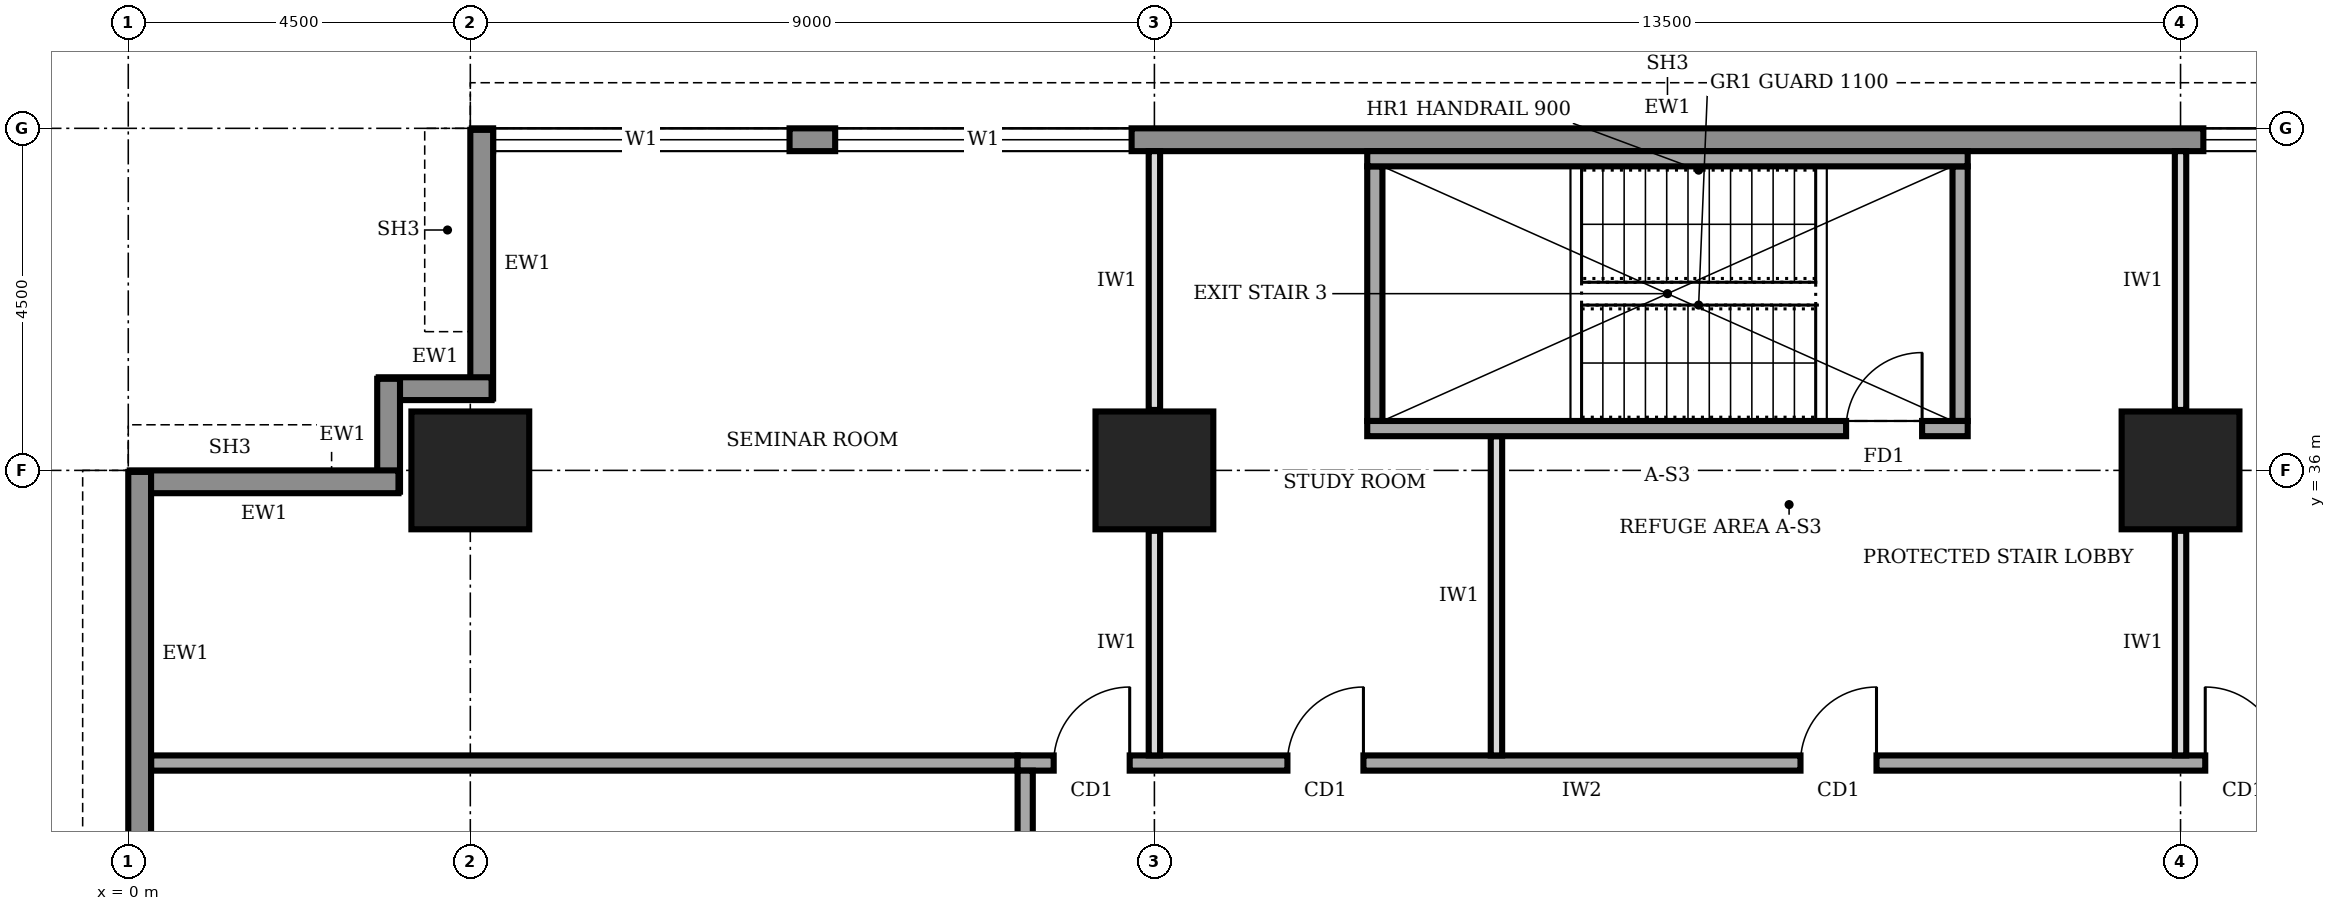
"""IFC4 building model, lengths in metres.
Left out: names, types, materials, properties, quantities, classifications, styles, units other than length and angle.
Written with IfcOpenShell. Run it as: python <this file> out.ifc"""

import sys

from ifc_helpers import new_model, si_unit, direction, frame, frame_2d, origin, origin_2d, place, context, subcontext, project, spatial, rectangle, extrude, element, fill, save


model = new_model("IFC4")
c1 = context("Model", 3, precision=1e-05, world=origin(), true_north=direction((0.0, 1.0)))
c2 = subcontext(c1, "Body", "Model", "MODEL_VIEW")
j1 = project(units=[si_unit("LENGTHUNIT", "METRE"), si_unit("PLANEANGLEUNIT", "RADIAN")], contexts=[c1])
p1 = place(None, origin())
s1 = spatial("IfcSite", under=j1, at=p1, CompositionType="ELEMENT")
p2 = place(p1, origin())
s2 = spatial("IfcBuilding", under=s1, at=p2, CompositionType="ELEMENT")
p3 = place(p2, frame((0.0, 0.0, 225.0)))
s3 = spatial("IfcBuildingStorey", under=s2, at=p3, CompositionType="ELEMENT", Elevation=225.0)
for number, where, z_axis, x_axis in (
    (1, (4.5, 36.0, 0.0), (0.0, 0.0, 1.0), (1.0, 0.0, 0.0)),
    (2, (13.5, 36.0, 0.0), (0.0, 0.0, 1.0), (1.0, 0.0, 0.0)),
    (3, (27.0, 36.0, 0.0), (0.0, 0.0, 1.0), (1.0, 0.0, 0.0)),
):
    element("IfcColumn", number, at=place(p3, frame(where, z_axis=z_axis, x_axis=x_axis)), inside=s3, PredefinedType="COLUMN", context=c2, shape_type="SweptSolid", body=[
        extrude(rectangle(XDim=1.55, YDim=1.55, at=origin_2d()), origin(), (0.0, 0.0, 1.0), 4.0),
    ])
p4 = place(p3, frame((35.98, 40.35, 0.0), z_axis=(0.0, 0.0, 1.0), x_axis=(-1.0, 0.0, 0.0)))
e4 = element("IfcWall", 4, at=p4, inside=s3, PredefinedType="STANDARD", context=c2, shape_type="SweptSolid", body=[
    extrude(rectangle(XDim=31.46, YDim=0.3, at=frame_2d((15.73, 0.0))), origin(), (0.0, 0.0, 1.0), 3.75),
])
p5 = place(p4, frame((27.28, 0.0, 0.9)))
e5 = element("IfcOpeningElement", 5, at=p5, cuts=e4, PredefinedType="OPENING", context=c2, shape_type="SweptSolid", body=[
    extrude(rectangle(XDim=3.9, YDim=2.2, at=frame_2d((1.95, 1.1))), frame((0.0, 0.16, 0.0), z_axis=(0.0, -1.0, 0.0), x_axis=(1.0, 0.0, 0.0)), (0.0, 0.0, 1.0), 0.32),
])
p6 = place(p4, frame((22.78, 0.0, 0.9)))
e6 = element("IfcOpeningElement", 6, at=p6, cuts=e4, PredefinedType="OPENING", context=c2, shape_type="SweptSolid", body=[
    extrude(rectangle(XDim=3.9, YDim=2.2, at=frame_2d((1.95, 1.1))), frame((0.0, 0.16, 0.0), z_axis=(0.0, -1.0, 0.0), x_axis=(1.0, 0.0, 0.0)), (0.0, 0.0, 1.0), 0.32),
])
p7 = place(p4, frame((4.78, 0.0, 0.9)))
e7 = element("IfcOpeningElement", 7, at=p7, cuts=e4, PredefinedType="OPENING", context=c2, shape_type="SweptSolid", body=[
    extrude(rectangle(XDim=3.9, YDim=2.2, at=frame_2d((1.95, 1.1))), frame((0.0, 0.16, 0.0), z_axis=(0.0, -1.0, 0.0), x_axis=(1.0, 0.0, 0.0)), (0.0, 0.0, 1.0), 0.32),
])
p8 = place(p3, frame((4.65, 40.48, 0.0), z_axis=(0.0, 0.0, 1.0), x_axis=(0.0, -1.0, 0.0)))
e8 = element("IfcWall", 8, at=p8, inside=s3, PredefinedType="STANDARD", context=c2, shape_type="SweptSolid", body=[
    extrude(rectangle(XDim=3.535, YDim=0.3, at=frame_2d((1.768, 0.0))), origin(), (0.0, 0.0, 1.0), 2.65),
])
for number, where, z_axis, x_axis in (
    (9, (4.78, 37.075, 0.0), (0.0, 0.0, 1.0), (-1.0, 0.0, 0.0)),
    (10, (3.425, 37.205, 0.0), (0.0, 0.0, 1.0), (0.0, -1.0, 0.0)),
):
    element("IfcWall", number, at=place(p3, frame(where, z_axis=z_axis, x_axis=x_axis)), inside=s3, PredefinedType="STANDARD", context=c2, shape_type="SweptSolid", body=[
        extrude(rectangle(XDim=1.485, YDim=0.3, at=frame_2d((0.743, 0.0))), origin(), (0.0, 0.0, 1.0), 3.75),
    ])
p9 = place(p3, frame((3.555, 35.85, 0.0), z_axis=(0.0, 0.0, 1.0), x_axis=(-1.0, 0.0, 0.0)))
e11 = element("IfcWall", 11, at=p9, inside=s3, PredefinedType="STANDARD", context=c2, shape_type="SweptSolid", body=[
    extrude(rectangle(XDim=3.535, YDim=0.3, at=frame_2d((1.768, 0.0))), origin(), (0.0, 0.0, 1.0), 2.65),
])
p10 = place(p3, frame((0.15, 35.98, 0.0), z_axis=(0.0, 0.0, 1.0), x_axis=(0.0, -1.0, 0.0)))
e12 = element("IfcWall", 12, at=p10, inside=s3, PredefinedType="STANDARD", context=c2, shape_type="SweptSolid", body=[
    extrude(rectangle(XDim=31.46, YDim=0.3, at=frame_2d((15.73, 0.0))), origin(), (0.0, 0.0, 1.0), 3.75),
])
p11 = place(p10, frame((27.28, 0.0, 0.9)))
e13 = element("IfcOpeningElement", 13, at=p11, cuts=e12, PredefinedType="OPENING", context=c2, shape_type="SweptSolid", body=[
    extrude(rectangle(XDim=3.9, YDim=2.2, at=frame_2d((1.95, 1.1))), frame((0.0, 0.16, 0.0), z_axis=(0.0, -1.0, 0.0), x_axis=(1.0, 0.0, 0.0)), (0.0, 0.0, 1.0), 0.32),
])
p12 = place(p10, frame((22.78, 0.0, 0.9)))
e14 = element("IfcOpeningElement", 14, at=p12, cuts=e12, PredefinedType="OPENING", context=c2, shape_type="SweptSolid", body=[
    extrude(rectangle(XDim=3.9, YDim=2.2, at=frame_2d((1.95, 1.1))), frame((0.0, 0.16, 0.0), z_axis=(0.0, -1.0, 0.0), x_axis=(1.0, 0.0, 0.0)), (0.0, 0.0, 1.0), 0.32),
])
p13 = place(p10, frame((18.28, 0.0, 0.9)))
e15 = element("IfcOpeningElement", 15, at=p13, cuts=e12, PredefinedType="OPENING", context=c2, shape_type="SweptSolid", body=[
    extrude(rectangle(XDim=3.9, YDim=2.2, at=frame_2d((1.95, 1.1))), frame((0.0, 0.16, 0.0), z_axis=(0.0, -1.0, 0.0), x_axis=(1.0, 0.0, 0.0)), (0.0, 0.0, 1.0), 0.32),
])
p14 = place(p10, frame((13.78, 0.0, 0.9)))
e16 = element("IfcOpeningElement", 16, at=p14, cuts=e12, PredefinedType="OPENING", context=c2, shape_type="SweptSolid", body=[
    extrude(rectangle(XDim=3.9, YDim=2.2, at=frame_2d((1.95, 1.1))), frame((0.0, 0.16, 0.0), z_axis=(0.0, -1.0, 0.0), x_axis=(1.0, 0.0, 0.0)), (0.0, 0.0, 1.0), 0.32),
])
p15 = place(p10, frame((9.28, 0.0, 0.9)))
e17 = element("IfcOpeningElement", 17, at=p15, cuts=e12, PredefinedType="OPENING", context=c2, shape_type="SweptSolid", body=[
    extrude(rectangle(XDim=3.9, YDim=2.2, at=frame_2d((1.95, 1.1))), frame((0.0, 0.16, 0.0), z_axis=(0.0, -1.0, 0.0), x_axis=(1.0, 0.0, 0.0)), (0.0, 0.0, 1.0), 0.32),
])
p16 = place(p10, frame((4.78, 0.0, 0.9)))
e18 = element("IfcOpeningElement", 18, at=p16, cuts=e12, PredefinedType="OPENING", context=c2, shape_type="SweptSolid", body=[
    extrude(rectangle(XDim=3.9, YDim=2.2, at=frame_2d((1.95, 1.1))), frame((0.0, 0.16, 0.0), z_axis=(0.0, -1.0, 0.0), x_axis=(1.0, 0.0, 0.0)), (0.0, 0.0, 1.0), 0.32),
])
p17 = place(p3, frame((28.6, 32.15, 0.0), z_axis=(0.0, 0.0, 1.0), x_axis=(-1.0, 0.0, 0.0)))
e19 = element("IfcWall", 19, at=p17, inside=s3, PredefinedType="SOLIDWALL", context=c2, shape_type="SweptSolid", body=[
    extrude(rectangle(XDim=16.9, YDim=0.2, at=frame_2d((8.45, 0.0))), origin(), (0.0, 0.0, 1.0), 3.75),
])
p18 = place(p17, frame((15.425, 0.0, 0.0)))
e20 = element("IfcOpeningElement", 20, at=p18, cuts=e19, PredefinedType="OPENING", context=c2, shape_type="SweptSolid", body=[
    extrude(rectangle(XDim=1.0, YDim=2.1, at=frame_2d((0.5, 1.05))), frame((0.0, 0.11, 0.0), z_axis=(0.0, -1.0, 0.0), x_axis=(1.0, 0.0, 0.0)), (0.0, 0.0, 1.0), 0.22),
])
p19 = place(p17, frame((12.35, 0.0, 0.0)))
e21 = element("IfcOpeningElement", 21, at=p19, cuts=e19, PredefinedType="OPENING", context=c2, shape_type="SweptSolid", body=[
    extrude(rectangle(XDim=1.0, YDim=2.1, at=frame_2d((0.5, 1.05))), frame((0.0, 0.11, 0.0), z_axis=(0.0, -1.0, 0.0), x_axis=(1.0, 0.0, 0.0)), (0.0, 0.0, 1.0), 0.22),
])
p20 = place(p17, frame((5.6, 0.0, 0.0)))
e22 = element("IfcOpeningElement", 22, at=p20, cuts=e19, PredefinedType="OPENING", context=c2, shape_type="SweptSolid", body=[
    extrude(rectangle(XDim=1.0, YDim=2.1, at=frame_2d((0.5, 1.05))), frame((0.0, 0.11, 0.0), z_axis=(0.0, -1.0, 0.0), x_axis=(1.0, 0.0, 0.0)), (0.0, 0.0, 1.0), 0.22),
])
p21 = place(p17, frame((0.275, 0.0, 0.0)))
e23 = element("IfcOpeningElement", 23, at=p21, cuts=e19, PredefinedType="OPENING", context=c2, shape_type="SweptSolid", body=[
    extrude(rectangle(XDim=1.0, YDim=2.1, at=frame_2d((0.5, 1.05))), frame((0.0, 0.11, 0.0), z_axis=(0.0, -1.0, 0.0), x_axis=(1.0, 0.0, 0.0)), (0.0, 0.0, 1.0), 0.22),
])
p22 = place(p3, frame((11.8, 32.05, 0.0), z_axis=(0.0, 0.0, 1.0), x_axis=(0.0, -1.0, 0.0)))
e24 = element("IfcWall", 24, at=p22, inside=s3, PredefinedType="SOLIDWALL", context=c2, shape_type="SweptSolid", body=[
    extrude(rectangle(XDim=23.8, YDim=0.2, at=frame_2d((11.9, 0.0))), origin(), (0.0, 0.0, 1.0), 3.75),
])
p23 = place(p22, frame((20.675, 0.0, 0.0)))
e25 = element("IfcOpeningElement", 25, at=p23, cuts=e24, PredefinedType="OPENING", context=c2, shape_type="SweptSolid", body=[
    extrude(rectangle(XDim=1.0, YDim=2.1, at=frame_2d((0.5, 1.05))), frame((0.0, 0.11, 0.0), z_axis=(0.0, -1.0, 0.0), x_axis=(1.0, 0.0, 0.0)), (0.0, 0.0, 1.0), 0.22),
])
p24 = place(p22, frame((16.95, 0.0, 0.0)))
e26 = element("IfcOpeningElement", 26, at=p24, cuts=e24, PredefinedType="OPENING", context=c2, shape_type="SweptSolid", body=[
    extrude(rectangle(XDim=1.0, YDim=2.1, at=frame_2d((0.5, 1.05))), frame((0.0, 0.11, 0.0), z_axis=(0.0, -1.0, 0.0), x_axis=(1.0, 0.0, 0.0)), (0.0, 0.0, 1.0), 0.22),
])
p25 = place(p22, frame((13.95, 0.0, 0.0)))
e27 = element("IfcOpeningElement", 27, at=p25, cuts=e24, PredefinedType="OPENING", context=c2, shape_type="SweptSolid", body=[
    extrude(rectangle(XDim=0.9, YDim=2.1, at=frame_2d((0.45, 1.05))), frame((0.0, 0.11, 0.0), z_axis=(0.0, -1.0, 0.0), x_axis=(1.0, 0.0, 0.0)), (0.0, 0.0, 1.0), 0.22),
])
p26 = place(p22, frame((10.9, 0.0, 0.0)))
e28 = element("IfcOpeningElement", 28, at=p26, cuts=e24, PredefinedType="OPENING", context=c2, shape_type="SweptSolid", body=[
    extrude(rectangle(XDim=0.9, YDim=2.1, at=frame_2d((0.45, 1.05))), frame((0.0, 0.11, 0.0), z_axis=(0.0, -1.0, 0.0), x_axis=(1.0, 0.0, 0.0)), (0.0, 0.0, 1.0), 0.22),
])
p27 = place(p22, frame((6.2, 0.0, 0.0)))
e29 = element("IfcOpeningElement", 29, at=p27, cuts=e24, PredefinedType="OPENING", context=c2, shape_type="SweptSolid", body=[
    extrude(rectangle(XDim=0.9, YDim=2.1, at=frame_2d((0.45, 1.05))), frame((0.0, 0.11, 0.0), z_axis=(0.0, -1.0, 0.0), x_axis=(1.0, 0.0, 0.0)), (0.0, 0.0, 1.0), 0.22),
])
p28 = place(p22, frame((8.75, 0.0, 0.0)))
e30 = element("IfcOpeningElement", 30, at=p28, cuts=e24, PredefinedType="OPENING", context=c2, shape_type="SweptSolid", body=[
    extrude(rectangle(XDim=1.0, YDim=2.1, at=frame_2d((0.5, 1.05))), frame((0.0, 0.11, 0.0), z_axis=(0.0, -1.0, 0.0), x_axis=(1.0, 0.0, 0.0)), (0.0, 0.0, 1.0), 0.22),
])
p29 = place(p22, frame((1.925, 0.0, 0.0)))
e31 = element("IfcOpeningElement", 31, at=p29, cuts=e24, PredefinedType="OPENING", context=c2, shape_type="SweptSolid", body=[
    extrude(rectangle(XDim=1.0, YDim=2.1, at=frame_2d((0.5, 1.05))), frame((0.0, 0.11, 0.0), z_axis=(0.0, -1.0, 0.0), x_axis=(1.0, 0.0, 0.0)), (0.0, 0.0, 1.0), 0.22),
])
p30 = place(p3, frame((0.3, 32.15, 0.0), z_axis=(0.0, 0.0, 1.0), x_axis=(1.0, 0.0, 0.0)))
e32 = element("IfcWall", 32, at=p30, inside=s3, PredefinedType="SOLIDWALL", context=c2, shape_type="SweptSolid", body=[
    extrude(rectangle(XDim=11.4, YDim=0.2, at=frame_2d((5.7, 0.0))), origin(), (0.0, 0.0, 1.0), 3.75),
])
p31 = place(p3, frame((13.5, 32.25, 0.0), z_axis=(0.0, 0.0, 1.0), x_axis=(0.0, 1.0, 0.0)))
e33 = element("IfcWall", 33, at=p31, inside=s3, PredefinedType="PARTITIONING", context=c2, shape_type="SweptSolid", body=[
    extrude(rectangle(XDim=2.955, YDim=0.15, at=frame_2d((1.478, 0.0))), origin(), (0.0, 0.0, 1.0), 2.85),
])
p32 = place(p3, frame((13.5, 36.795, 0.0), z_axis=(0.0, 0.0, 1.0), x_axis=(0.0, 1.0, 0.0)))
e34 = element("IfcWall", 34, at=p32, inside=s3, PredefinedType="PARTITIONING", context=c2, shape_type="SweptSolid", body=[
    extrude(rectangle(XDim=3.405, YDim=0.15, at=frame_2d((1.703, 0.0))), origin(), (0.0, 0.0, 1.0), 2.65),
])
p33 = place(p3, frame((18.0, 32.25, 0.0), z_axis=(0.0, 0.0, 1.0), x_axis=(0.0, 1.0, 0.0)))
e35 = element("IfcWall", 35, at=p33, inside=s3, PredefinedType="PARTITIONING", context=c2, shape_type="SweptSolid", body=[
    extrude(rectangle(XDim=4.2, YDim=0.15, at=frame_2d((2.1, 0.0))), origin(), (0.0, 0.0, 1.0), 3.75),
])
p34 = place(p3, frame((27.0, 32.25, 0.0), z_axis=(0.0, 0.0, 1.0), x_axis=(0.0, 1.0, 0.0)))
e36 = element("IfcWall", 36, at=p34, inside=s3, PredefinedType="PARTITIONING", context=c2, shape_type="SweptSolid", body=[
    extrude(rectangle(XDim=2.955, YDim=0.15, at=frame_2d((1.478, 0.0))), origin(), (0.0, 0.0, 1.0), 2.85),
])
p35 = place(p3, frame((27.0, 36.795, 0.0), z_axis=(0.0, 0.0, 1.0), x_axis=(0.0, 1.0, 0.0)))
e37 = element("IfcWall", 37, at=p35, inside=s3, PredefinedType="PARTITIONING", context=c2, shape_type="SweptSolid", body=[
    extrude(rectangle(XDim=3.405, YDim=0.15, at=frame_2d((1.703, 0.0))), origin(), (0.0, 0.0, 1.0), 2.65),
])
p36 = place(p3, frame((16.3, 36.55, 0.0), z_axis=(0.0, 0.0, 1.0), x_axis=(1.0, 0.0, 0.0)))
e38 = element("IfcWall", 38, at=p36, inside=s3, PredefinedType="SOLIDWALL", context=c2, shape_type="SweptSolid", body=[
    extrude(rectangle(XDim=7.9, YDim=0.2, at=frame_2d((3.95, 0.0))), origin(), (0.0, 0.0, 1.0), 3.75),
])
p37 = place(p36, frame((6.3, 0.0, 0.0)))
e39 = element("IfcOpeningElement", 39, at=p37, cuts=e38, PredefinedType="OPENING", context=c2, shape_type="SweptSolid", body=[
    extrude(rectangle(XDim=1.0, YDim=2.1, at=frame_2d((0.5, 1.05))), frame((0.0, 0.11, 0.0), z_axis=(0.0, -1.0, 0.0), x_axis=(1.0, 0.0, 0.0)), (0.0, 0.0, 1.0), 0.22),
])
p38 = place(p3, frame((16.3, 40.1, 0.0), z_axis=(0.0, 0.0, 1.0), x_axis=(1.0, 0.0, 0.0)))
e40 = element("IfcWall", 40, at=p38, inside=s3, PredefinedType="SOLIDWALL", context=c2, shape_type="SweptSolid", body=[
    extrude(rectangle(XDim=7.9, YDim=0.2, at=frame_2d((3.95, 0.0))), origin(), (0.0, 0.0, 1.0), 3.75),
])
for number, where, z_axis, x_axis in (
    (41, (16.4, 36.65, 0.0), (0.0, 0.0, 1.0), (0.0, 1.0, 0.0)),
    (42, (24.1, 36.65, 0.0), (0.0, 0.0, 1.0), (0.0, 1.0, 0.0)),
):
    element("IfcWall", number, at=place(p3, frame(where, z_axis=z_axis, x_axis=x_axis)), inside=s3, PredefinedType="SOLIDWALL", context=c2, shape_type="SweptSolid", body=[
        extrude(rectangle(XDim=3.35, YDim=0.2, at=frame_2d((1.675, 0.0))), origin(), (0.0, 0.0, 1.0), 3.75),
    ])
p39 = place(p5, origin())
e43 = element("IfcWindow", 43, at=p39, inside=s3, PartitioningType="SINGLE_PANEL", PredefinedType="WINDOW", context=c2, shape_type="SweptSolid", body=[
    extrude(rectangle(XDim=3.9, YDim=2.2, at=frame_2d((1.95, 1.1))), frame((0.0, 0.03, 0.0), z_axis=(0.0, -1.0, 0.0), x_axis=(1.0, 0.0, 0.0)), (0.0, 0.0, 1.0), 0.06),
])
fill(e5, e43)
p40 = place(p6, origin())
e44 = element("IfcWindow", 44, at=p40, inside=s3, PartitioningType="SINGLE_PANEL", PredefinedType="WINDOW", context=c2, shape_type="SweptSolid", body=[
    extrude(rectangle(XDim=3.9, YDim=2.2, at=frame_2d((1.95, 1.1))), frame((0.0, 0.03, 0.0), z_axis=(0.0, -1.0, 0.0), x_axis=(1.0, 0.0, 0.0)), (0.0, 0.0, 1.0), 0.06),
])
fill(e6, e44)
p41 = place(p7, origin())
e45 = element("IfcWindow", 45, at=p41, inside=s3, PartitioningType="SINGLE_PANEL", PredefinedType="WINDOW", context=c2, shape_type="SweptSolid", body=[
    extrude(rectangle(XDim=3.9, YDim=2.2, at=frame_2d((1.95, 1.1))), frame((0.0, 0.03, 0.0), z_axis=(0.0, -1.0, 0.0), x_axis=(1.0, 0.0, 0.0)), (0.0, 0.0, 1.0), 0.06),
])
fill(e7, e45)
p42 = place(p18, frame((1.0, 0.0, 0.0), z_axis=(0.0, 0.0, 1.0), x_axis=(-1.0, 0.0, 0.0)))
e46 = element("IfcDoor", 46, at=p42, inside=s3, OperationType="SINGLE_SWING_RIGHT", PredefinedType="DOOR", context=c2, shape_type="SweptSolid", body=[
    extrude(rectangle(XDim=1.0, YDim=2.1, at=frame_2d((0.5, 1.05))), frame((0.0, 0.025, 0.0), z_axis=(0.0, -1.0, 0.0), x_axis=(1.0, 0.0, 0.0)), (0.0, 0.0, 1.0), 0.05),
])
fill(e20, e46)
p43 = place(p19, frame((1.0, 0.0, 0.0), z_axis=(0.0, 0.0, 1.0), x_axis=(-1.0, 0.0, 0.0)))
e47 = element("IfcDoor", 47, at=p43, inside=s3, OperationType="SINGLE_SWING_RIGHT", PredefinedType="DOOR", context=c2, shape_type="SweptSolid", body=[
    extrude(rectangle(XDim=1.0, YDim=2.1, at=frame_2d((0.5, 1.05))), frame((0.0, 0.025, 0.0), z_axis=(0.0, -1.0, 0.0), x_axis=(1.0, 0.0, 0.0)), (0.0, 0.0, 1.0), 0.05),
])
fill(e21, e47)
p44 = place(p20, frame((1.0, 0.0, 0.0), z_axis=(0.0, 0.0, 1.0), x_axis=(-1.0, 0.0, 0.0)))
e48 = element("IfcDoor", 48, at=p44, inside=s3, OperationType="SINGLE_SWING_RIGHT", PredefinedType="DOOR", context=c2, shape_type="SweptSolid", body=[
    extrude(rectangle(XDim=1.0, YDim=2.1, at=frame_2d((0.5, 1.05))), frame((0.0, 0.025, 0.0), z_axis=(0.0, -1.0, 0.0), x_axis=(1.0, 0.0, 0.0)), (0.0, 0.0, 1.0), 0.05),
])
fill(e22, e48)
p45 = place(p21, frame((1.0, 0.0, 0.0), z_axis=(0.0, 0.0, 1.0), x_axis=(-1.0, 0.0, 0.0)))
e49 = element("IfcDoor", 49, at=p45, inside=s3, OperationType="SINGLE_SWING_LEFT", PredefinedType="DOOR", context=c2, shape_type="SweptSolid", body=[
    extrude(rectangle(XDim=1.0, YDim=2.1, at=frame_2d((0.5, 1.05))), frame((0.0, 0.025, 0.0), z_axis=(0.0, -1.0, 0.0), x_axis=(1.0, 0.0, 0.0)), (0.0, 0.0, 1.0), 0.05),
])
fill(e23, e49)
p46 = place(p37, origin())
e50 = element("IfcDoor", 50, at=p46, inside=s3, OperationType="SINGLE_SWING_RIGHT", PredefinedType="DOOR", context=c2, shape_type="SweptSolid", body=[
    extrude(rectangle(XDim=1.0, YDim=2.1, at=frame_2d((0.5, 1.05))), frame((0.0, 0.025, 0.0), z_axis=(0.0, -1.0, 0.0), x_axis=(1.0, 0.0, 0.0)), (0.0, 0.0, 1.0), 0.05),
])
fill(e39, e50)
save(model, sys.argv[1])
